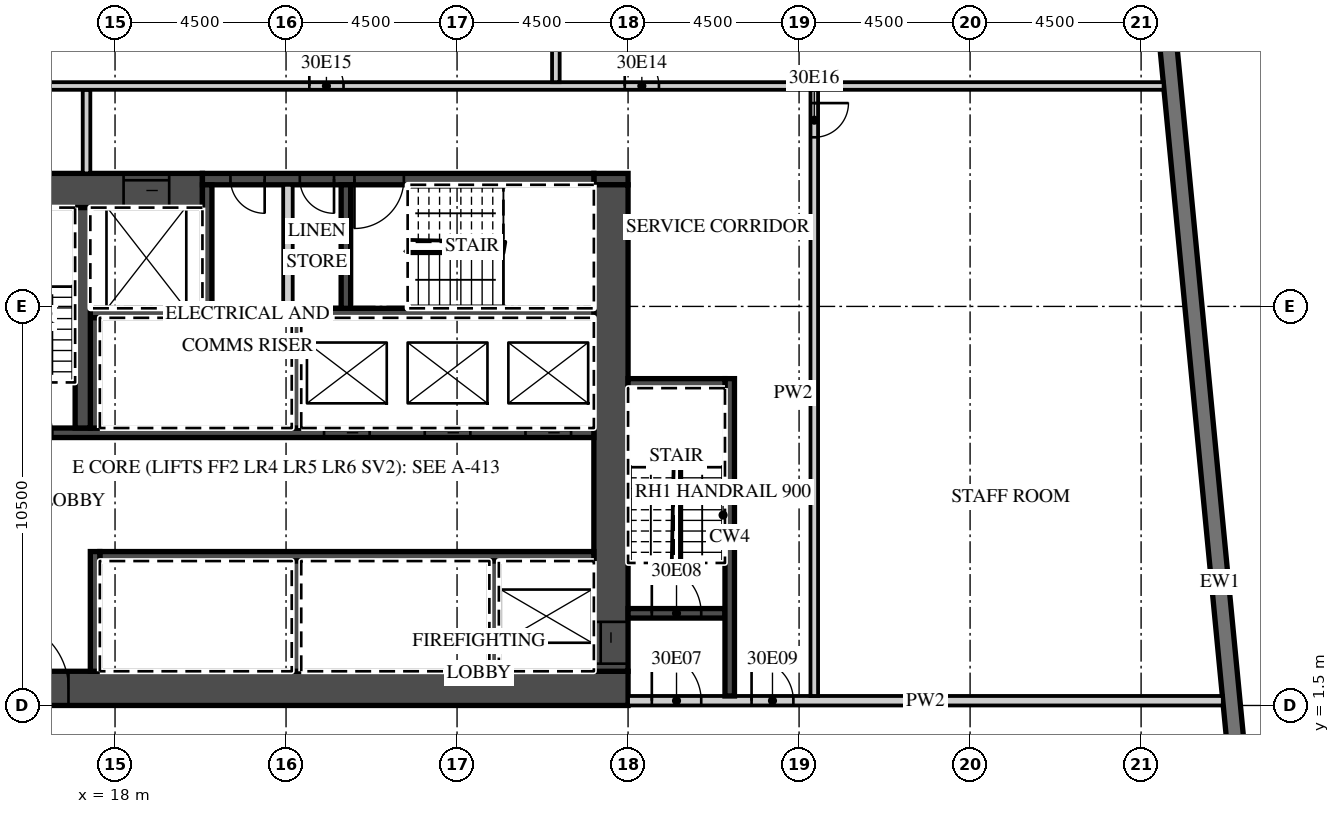
"""IFC4 building model, lengths in metres.
Left out: names, types, materials, properties, quantities, classifications, styles, units other than length and angle.
Written with IfcOpenShell. Run it as: python <this file> out.ifc"""

import sys

from ifc_helpers import new_model, si_unit, direction, frame, frame_2d, origin, place, context, subcontext, project, spatial, rectangle, extrude, element, fill, save


model = new_model("IFC4")
c1 = context("Model", 3, precision=1e-05, world=origin(), true_north=direction((0.0, 1.0)))
c2 = subcontext(c1, "Body", "Model", "MODEL_VIEW")
j1 = project(units=[si_unit("LENGTHUNIT", "METRE"), si_unit("PLANEANGLEUNIT", "RADIAN")], contexts=[c1])
p1 = place(None, origin())
s1 = spatial("IfcSite", under=j1, at=p1, CompositionType="ELEMENT")
p2 = place(p1, origin())
s2 = spatial("IfcBuilding", under=s1, at=p2, CompositionType="ELEMENT")
p3 = place(p2, frame((0.0, 0.0, 133.9)))
s3 = spatial("IfcBuildingStorey", under=s2, at=p3, CompositionType="ELEMENT", Elevation=133.9)
p4 = place(p3, frame((48.753, -12.672, 0.0), z_axis=(0.0, 0.0, 1.0), x_axis=(-0.095842661909, 0.995396495954, 0.0)))
e1 = element("IfcWall", 1, at=p4, inside=s3, PredefinedType="SOLIDWALL", context=c2, shape_type="SweptSolid", body=[
    extrude(rectangle(XDim=35.0, YDim=0.45, at=frame_2d((17.5, 0.0))), origin(), (0.0, 0.0, 1.0), 3.02),
])
p5 = place(p4, frame((3.072, 0.0, 0.45)))
e2 = element("IfcOpeningElement", 2, at=p5, cuts=e1, PredefinedType="OPENING", context=c2, shape_type="SweptSolid", body=[
    extrude(rectangle(XDim=3.3, YDim=2.25, at=frame_2d((1.65, 1.125))), frame((0.0, 0.235, 0.0), z_axis=(0.0, -1.0, 0.0), x_axis=(1.0, 0.0, 0.0)), (0.0, 0.0, 1.0), 0.47),
])
p6 = place(p4, frame((7.593, 0.0, 0.45)))
e3 = element("IfcOpeningElement", 3, at=p6, cuts=e1, PredefinedType="OPENING", context=c2, shape_type="SweptSolid", body=[
    extrude(rectangle(XDim=3.3, YDim=2.25, at=frame_2d((1.65, 1.125))), frame((0.0, 0.235, 0.0), z_axis=(0.0, -1.0, 0.0), x_axis=(1.0, 0.0, 0.0)), (0.0, 0.0, 1.0), 0.47),
])
p7 = place(p3, frame((13.5, 1.95, 0.0), z_axis=(0.0, 0.0, 1.0), x_axis=(1.0, 0.0, 0.0)))
e4 = element("IfcWall", 4, at=p7, inside=s3, PredefinedType="SHEAR", context=c2, shape_type="SweptSolid", body=[
    extrude(rectangle(XDim=18.0, YDim=0.9, at=frame_2d((9.0, 0.0))), origin(), (0.0, 0.0, 1.0), 3.02),
])
p8 = place(p7, frame((1.475, 0.0, 0.0)))
e5 = element("IfcOpeningElement", 5, at=p8, cuts=e4, PredefinedType="OPENING", context=c2, shape_type="SweptSolid", body=[
    extrude(rectangle(XDim=1.8, YDim=2.1, at=frame_2d((0.9, 1.05))), frame((0.0, 0.46, 0.0), z_axis=(0.0, -1.0, 0.0), x_axis=(1.0, 0.0, 0.0)), (0.0, 0.0, 1.0), 0.92),
])
p9 = place(p3, frame((13.5, 15.05, 0.0), z_axis=(0.0, 0.0, 1.0), x_axis=(1.0, 0.0, 0.0)))
e6 = element("IfcWall", 6, at=p9, inside=s3, PredefinedType="SHEAR", context=c2, shape_type="SweptSolid", body=[
    extrude(rectangle(XDim=6.8, YDim=0.9, at=frame_2d((3.4, 0.0))), origin(), (0.0, 0.0, 1.0), 3.02),
])
p10 = place(p9, frame((4.725, 0.0, 0.0)))
e7 = element("IfcOpeningElement", 7, at=p10, cuts=e6, PredefinedType="OPENING", context=c2, shape_type="SweptSolid", body=[
    extrude(rectangle(XDim=1.2, YDim=2.1, at=frame_2d((0.6, 1.05))), frame((0.0, 0.46, 0.0), z_axis=(0.0, -1.0, 0.0), x_axis=(1.0, 0.0, 0.0)), (0.0, 0.0, 1.0), 0.92),
])
p11 = place(p3, frame((30.6, 15.35, 0.0), z_axis=(0.0, 0.0, 1.0), x_axis=(1.0, 0.0, 0.0)))
e8 = element("IfcWall", 8, at=p11, inside=s3, PredefinedType="SHEAR", context=c2, shape_type="SweptSolid", body=[
    extrude(rectangle(XDim=0.9, YDim=0.3, at=frame_2d((0.45, 0.0))), origin(), (0.0, 0.0, 1.0), 3.02),
])
p12 = place(p3, frame((20.3, 15.35, 0.0), z_axis=(0.0, 0.0, 1.0), x_axis=(1.0, 0.0, 0.0)))
e9 = element("IfcWall", 9, at=p12, inside=s3, PredefinedType="SHEAR", context=c2, shape_type="SweptSolid", body=[
    extrude(rectangle(XDim=10.3, YDim=0.3, at=frame_2d((5.15, 0.0))), origin(), (0.0, 0.0, 1.0), 3.02),
])
p13 = place(p12, frame((4.0, 0.0, 0.0)))
e10 = element("IfcOpeningElement", 10, at=p13, cuts=e9, PredefinedType="OPENING", context=c2, shape_type="SweptSolid", body=[
    extrude(rectangle(XDim=1.3, YDim=2.1, at=frame_2d((0.65, 1.05))), frame((0.0, 0.16, 0.0), z_axis=(0.0, -1.0, 0.0), x_axis=(1.0, 0.0, 0.0)), (0.0, 0.0, 1.0), 0.32),
])
p14 = place(p12, frame((2.562, 0.0, 0.0)))
e11 = element("IfcOpeningElement", 11, at=p14, cuts=e9, PredefinedType="OPENING", context=c2, shape_type="SweptSolid", body=[
    extrude(rectangle(XDim=0.9, YDim=2.1, at=frame_2d((0.45, 1.05))), frame((0.0, 0.16, 0.0), z_axis=(0.0, -1.0, 0.0), x_axis=(1.0, 0.0, 0.0)), (0.0, 0.0, 1.0), 0.32),
])
p15 = place(p12, frame((0.738, 0.0, 0.0)))
e12 = element("IfcOpeningElement", 12, at=p15, cuts=e9, PredefinedType="OPENING", context=c2, shape_type="SweptSolid", body=[
    extrude(rectangle(XDim=0.9, YDim=2.1, at=frame_2d((0.45, 1.05))), frame((0.0, 0.16, 0.0), z_axis=(0.0, -1.0, 0.0), x_axis=(1.0, 0.0, 0.0)), (0.0, 0.0, 1.0), 0.32),
])
p16 = place(p3, frame((31.05, 2.4, 0.0), z_axis=(0.0, 0.0, 1.0), x_axis=(0.0, 1.0, 0.0)))
e13 = element("IfcWall", 13, at=p16, inside=s3, PredefinedType="SHEAR", context=c2, shape_type="SweptSolid", body=[
    extrude(rectangle(XDim=12.8, YDim=0.9, at=frame_2d((6.4, 0.0))), origin(), (0.0, 0.0, 1.0), 3.02),
])
p17 = place(p16, frame((0.2, 0.0, 0.0)))
e14 = element("IfcOpeningElement", 14, at=p17, cuts=e13, PredefinedType="OPENING", context=c2, shape_type="SweptSolid", body=[
    extrude(rectangle(XDim=1.1, YDim=2.1, at=frame_2d((0.55, 1.05))), frame((0.0, 0.46, 0.0), z_axis=(0.0, -1.0, 0.0), x_axis=(1.0, 0.0, 0.0)), (0.0, 0.0, 1.0), 0.92),
])
p18 = place(p3, frame((17.6, 5.425, 0.0), z_axis=(0.0, 0.0, 1.0), x_axis=(1.0, 0.0, 0.0)))
e15 = element("IfcWall", 15, at=p18, inside=s3, PredefinedType="SHEAR", context=c2, shape_type="SweptSolid", body=[
    extrude(rectangle(XDim=13.0, YDim=0.25, at=frame_2d((6.5, 0.0))), origin(), (0.0, 0.0, 1.0), 3.02),
])
p19 = place(p3, frame((17.475, 2.4, 0.0), z_axis=(0.0, 0.0, 1.0), x_axis=(0.0, 1.0, 0.0)))
e16 = element("IfcWall", 16, at=p19, inside=s3, PredefinedType="SHEAR", context=c2, shape_type="SweptSolid", body=[
    extrude(rectangle(XDim=3.15, YDim=0.25, at=frame_2d((1.575, 0.0))), origin(), (0.0, 0.0, 1.0), 3.02),
])
for number, where, z_axis, x_axis in (
    (17, (27.975, 2.4, 0.0), (0.0, 0.0, 1.0), (0.0, 1.0, 0.0)),
    (18, (22.775, 2.4, 0.0), (0.0, 0.0, 1.0), (0.0, 1.0, 0.0)),
):
    element("IfcWall", number, at=place(p3, frame(where, z_axis=z_axis, x_axis=x_axis)), inside=s3, PredefinedType="SHEAR", context=c2, shape_type="SweptSolid", body=[
        extrude(rectangle(XDim=2.9, YDim=0.25, at=frame_2d((1.45, 0.0))), origin(), (0.0, 0.0, 1.0), 3.02),
    ])
p20 = place(p3, frame((14.4, 8.675, 0.0), z_axis=(0.0, 0.0, 1.0), x_axis=(1.0, 0.0, 0.0)))
e19 = element("IfcWall", 19, at=p20, inside=s3, PredefinedType="SHEAR", context=c2, shape_type="SweptSolid", body=[
    extrude(rectangle(XDim=16.2, YDim=0.25, at=frame_2d((8.1, 0.0))), origin(), (0.0, 0.0, 1.0), 3.02),
])
p21 = place(p20, frame((14.4, 0.0, 0.0)))
e20 = element("IfcOpeningElement", 20, at=p21, cuts=e19, PredefinedType="OPENING", context=c2, shape_type="SweptSolid", body=[
    extrude(rectangle(XDim=1.2, YDim=2.1, at=frame_2d((0.6, 1.05))), frame((0.0, 0.135, 0.0), z_axis=(0.0, -1.0, 0.0), x_axis=(1.0, 0.0, 0.0)), (0.0, 0.0, 1.0), 0.27),
])
p22 = place(p20, frame((11.75, 0.0, 0.0)))
e21 = element("IfcOpeningElement", 21, at=p22, cuts=e19, PredefinedType="OPENING", context=c2, shape_type="SweptSolid", body=[
    extrude(rectangle(XDim=1.2, YDim=2.1, at=frame_2d((0.6, 1.05))), frame((0.0, 0.135, 0.0), z_axis=(0.0, -1.0, 0.0), x_axis=(1.0, 0.0, 0.0)), (0.0, 0.0, 1.0), 0.27),
])
p23 = place(p20, frame((9.1, 0.0, 0.0)))
e22 = element("IfcOpeningElement", 22, at=p23, cuts=e19, PredefinedType="OPENING", context=c2, shape_type="SweptSolid", body=[
    extrude(rectangle(XDim=1.2, YDim=2.1, at=frame_2d((0.6, 1.05))), frame((0.0, 0.135, 0.0), z_axis=(0.0, -1.0, 0.0), x_axis=(1.0, 0.0, 0.0)), (0.0, 0.0, 1.0), 0.27),
])
p24 = place(p20, frame((0.65, 0.0, 0.0)))
e23 = element("IfcOpeningElement", 23, at=p24, cuts=e19, PredefinedType="OPENING", context=c2, shape_type="SweptSolid", body=[
    extrude(rectangle(XDim=1.3, YDim=2.1, at=frame_2d((0.65, 1.05))), frame((0.0, 0.135, 0.0), z_axis=(0.0, -1.0, 0.0), x_axis=(1.0, 0.0, 0.0)), (0.0, 0.0, 1.0), 0.27),
])
p25 = place(p3, frame((17.35, 11.825, 0.0), z_axis=(0.0, 0.0, 1.0), x_axis=(1.0, 0.0, 0.0)))
e24 = element("IfcWall", 24, at=p25, inside=s3, PredefinedType="SHEAR", context=c2, shape_type="SweptSolid", body=[
    extrude(rectangle(XDim=13.25, YDim=0.25, at=frame_2d((6.625, 0.0))), origin(), (0.0, 0.0, 1.0), 3.02),
])
for number, where, z_axis, x_axis in (
    (25, (17.475, 8.8, 0.0), (0.0, 0.0, 1.0), (0.0, 1.0, 0.0)),
    (26, (22.775, 8.8, 0.0), (0.0, 0.0, 1.0), (0.0, 1.0, 0.0)),
):
    element("IfcWall", number, at=place(p3, frame(where, z_axis=z_axis, x_axis=x_axis)), inside=s3, PredefinedType="SHEAR", context=c2, shape_type="SweptSolid", body=[
        extrude(rectangle(XDim=2.9, YDim=0.25, at=frame_2d((1.45, 0.0))), origin(), (0.0, 0.0, 1.0), 3.02),
    ])
p26 = place(p3, frame((17.15, 8.8, 0.0), z_axis=(0.0, 0.0, 1.0), x_axis=(0.0, 1.0, 0.0)))
e27 = element("IfcWall", 27, at=p26, inside=s3, PredefinedType="SHEAR", context=c2, shape_type="SweptSolid", body=[
    extrude(rectangle(XDim=5.8, YDim=0.4, at=frame_2d((2.9, 0.0))), origin(), (0.0, 0.0, 1.0), 3.02),
])
for number, where, z_axis, x_axis in (
    (28, (20.425, 11.95, 0.0), (0.0, 0.0, 1.0), (0.0, 1.0, 0.0)),
    (29, (24.075, 11.95, 0.0), (0.0, 0.0, 1.0), (0.0, 1.0, 0.0)),
):
    element("IfcWall", number, at=place(p3, frame(where, z_axis=z_axis, x_axis=x_axis)), inside=s3, PredefinedType="SHEAR", context=c2, shape_type="SweptSolid", body=[
        extrude(rectangle(XDim=3.25, YDim=0.25, at=frame_2d((1.625, 0.0))), origin(), (0.0, 0.0, 1.0), 3.02),
    ])
p27 = place(p3, frame((22.55, 11.95, 0.0), z_axis=(0.0, 0.0, 1.0), x_axis=(0.0, 1.0, 0.0)))
e30 = element("IfcWall", 30, at=p27, inside=s3, PredefinedType="PARTITIONING", context=c2, shape_type="SweptSolid", body=[
    extrude(rectangle(XDim=3.25, YDim=0.25, at=frame_2d((1.625, 0.0))), origin(), (0.0, 0.0, 1.0), 3.02),
])
p28 = place(p3, frame((31.5, 1.625, 0.0), z_axis=(0.0, 0.0, 1.0), x_axis=(1.0, 0.0, 0.0)))
e31 = element("IfcWall", 31, at=p28, inside=s3, PredefinedType="PARTITIONING", context=c2, shape_type="SweptSolid", body=[
    extrude(rectangle(XDim=15.65, YDim=0.25, at=frame_2d((7.825, 0.0))), origin(), (0.0, 0.0, 1.0), 3.02),
])
p29 = place(p28, frame((0.625, 0.0, 0.0)))
e32 = element("IfcOpeningElement", 32, at=p29, cuts=e31, PredefinedType="OPENING", context=c2, shape_type="SweptSolid", body=[
    extrude(rectangle(XDim=1.3, YDim=2.1, at=frame_2d((0.65, 1.05))), frame((0.0, 0.135, 0.0), z_axis=(0.0, -1.0, 0.0), x_axis=(1.0, 0.0, 0.0)), (0.0, 0.0, 1.0), 0.27),
])
p30 = place(p28, frame((3.25, 0.0, 0.0)))
e33 = element("IfcOpeningElement", 33, at=p30, cuts=e31, PredefinedType="OPENING", context=c2, shape_type="SweptSolid", body=[
    extrude(rectangle(XDim=1.1, YDim=2.1, at=frame_2d((0.55, 1.05))), frame((0.0, 0.135, 0.0), z_axis=(0.0, -1.0, 0.0), x_axis=(1.0, 0.0, 0.0)), (0.0, 0.0, 1.0), 0.27),
])
p31 = place(p3, frame((31.5, 3.925, 0.0), z_axis=(0.0, 0.0, 1.0), x_axis=(1.0, 0.0, 0.0)))
e34 = element("IfcWall", 34, at=p31, inside=s3, PredefinedType="SHEAR", context=c2, shape_type="SweptSolid", body=[
    extrude(rectangle(XDim=2.55, YDim=0.25, at=frame_2d((1.275, 0.0))), origin(), (0.0, 0.0, 1.0), 3.02),
])
p32 = place(p31, frame((0.625, 0.0, 0.0)))
e35 = element("IfcOpeningElement", 35, at=p32, cuts=e34, PredefinedType="OPENING", context=c2, shape_type="SweptSolid", body=[
    extrude(rectangle(XDim=1.3, YDim=2.1, at=frame_2d((0.65, 1.05))), frame((0.0, 0.135, 0.0), z_axis=(0.0, -1.0, 0.0), x_axis=(1.0, 0.0, 0.0)), (0.0, 0.0, 1.0), 0.27),
])
p33 = place(p3, frame((34.175, 1.75, 0.0), z_axis=(0.0, 0.0, 1.0), x_axis=(0.0, 1.0, 0.0)))
e36 = element("IfcWall", 36, at=p33, inside=s3, PredefinedType="SHEAR", context=c2, shape_type="SweptSolid", body=[
    extrude(rectangle(XDim=8.35, YDim=0.25, at=frame_2d((4.175, 0.0))), origin(), (0.0, 0.0, 1.0), 3.02),
])
p34 = place(p3, frame((31.5, 9.975, 0.0), z_axis=(0.0, 0.0, 1.0), x_axis=(1.0, 0.0, 0.0)))
e37 = element("IfcWall", 37, at=p34, inside=s3, PredefinedType="SHEAR", context=c2, shape_type="SweptSolid", body=[
    extrude(rectangle(XDim=2.55, YDim=0.25, at=frame_2d((1.275, 0.0))), origin(), (0.0, 0.0, 1.0), 3.02),
])
p35 = place(p3, frame((17.25, 15.5, 0.0), z_axis=(0.0, 0.0, 1.0), x_axis=(0.0, 1.0, 0.0)))
e38 = element("IfcWall", 38, at=p35, inside=s3, PredefinedType="PARTITIONING", context=c2, shape_type="SweptSolid", body=[
    extrude(rectangle(XDim=2.2, YDim=0.2, at=frame_2d((1.1, 0.0))), origin(), (0.0, 0.0, 1.0), 3.02),
])
p36 = place(p3, frame((36.4, 1.75, 0.0), z_axis=(0.0, 0.0, 1.0), x_axis=(0.0, 1.0, 0.0)))
e39 = element("IfcWall", 39, at=p36, inside=s3, PredefinedType="PARTITIONING", context=c2, shape_type="SweptSolid", body=[
    extrude(rectangle(XDim=15.95, YDim=0.2, at=frame_2d((7.975, 0.0))), origin(), (0.0, 0.0, 1.0), 3.02),
])
p37 = place(p36, frame((14.7, 0.0, 0.0)))
e40 = element("IfcOpeningElement", 40, at=p37, cuts=e39, PredefinedType="OPENING", context=c2, shape_type="SweptSolid", body=[
    extrude(rectangle(XDim=0.9, YDim=2.1, at=frame_2d((0.45, 1.05))), frame((0.0, 0.11, 0.0), z_axis=(0.0, -1.0, 0.0), x_axis=(1.0, 0.0, 0.0)), (0.0, 0.0, 1.0), 0.22),
])
p38 = place(p3, frame((13.6, 17.8, 0.0), z_axis=(0.0, 0.0, 1.0), x_axis=(1.0, 0.0, 0.0)))
e41 = element("IfcWall", 41, at=p38, inside=s3, PredefinedType="PARTITIONING", context=c2, shape_type="SweptSolid", body=[
    extrude(rectangle(XDim=31.993, YDim=0.2, at=frame_2d((15.997, 0.0))), origin(), (0.0, 0.0, 1.0), 3.02),
])
p39 = place(p38, frame((17.812, 0.0, 0.0)))
e42 = element("IfcOpeningElement", 42, at=p39, cuts=e41, PredefinedType="OPENING", context=c2, shape_type="SweptSolid", body=[
    extrude(rectangle(XDim=0.9, YDim=2.1, at=frame_2d((0.45, 1.05))), frame((0.0, 0.11, 0.0), z_axis=(0.0, -1.0, 0.0), x_axis=(1.0, 0.0, 0.0)), (0.0, 0.0, 1.0), 0.22),
])
p40 = place(p38, frame((9.512, 0.0, 0.0)))
e43 = element("IfcOpeningElement", 43, at=p40, cuts=e41, PredefinedType="OPENING", context=c2, shape_type="SweptSolid", body=[
    extrude(rectangle(XDim=0.9, YDim=2.1, at=frame_2d((0.45, 1.05))), frame((0.0, 0.11, 0.0), z_axis=(0.0, -1.0, 0.0), x_axis=(1.0, 0.0, 0.0)), (0.0, 0.0, 1.0), 0.22),
])
p41 = place(p3, frame((29.6, 17.9, 0.0), z_axis=(0.0, 0.0, 1.0), x_axis=(0.0, 1.0, 0.0)))
e44 = element("IfcWall", 44, at=p41, inside=s3, PredefinedType="PARTITIONING", context=c2, shape_type="SweptSolid", body=[
    extrude(rectangle(XDim=6.313, YDim=0.2, at=frame_2d((3.157, 0.0))), origin(), (0.0, 0.0, 1.0), 3.02),
])
p42 = place(p21, origin())
e45 = element("IfcDoor", 45, at=p42, inside=s3, OperationType="SLIDING_TO_LEFT", PredefinedType="DOOR", context=c2, shape_type="SweptSolid", body=[
    extrude(rectangle(XDim=1.2, YDim=2.1, at=frame_2d((0.6, 1.05))), frame((0.0, 0.025, 0.0), z_axis=(0.0, -1.0, 0.0), x_axis=(1.0, 0.0, 0.0)), (0.0, 0.0, 1.0), 0.05),
])
fill(e20, e45)
p43 = place(p22, origin())
e46 = element("IfcDoor", 46, at=p43, inside=s3, OperationType="SLIDING_TO_RIGHT", PredefinedType="DOOR", context=c2, shape_type="SweptSolid", body=[
    extrude(rectangle(XDim=1.2, YDim=2.1, at=frame_2d((0.6, 1.05))), frame((0.0, 0.025, 0.0), z_axis=(0.0, -1.0, 0.0), x_axis=(1.0, 0.0, 0.0)), (0.0, 0.0, 1.0), 0.05),
])
fill(e21, e46)
p44 = place(p23, origin())
e47 = element("IfcDoor", 47, at=p44, inside=s3, OperationType="SLIDING_TO_RIGHT", PredefinedType="DOOR", context=c2, shape_type="SweptSolid", body=[
    extrude(rectangle(XDim=1.2, YDim=2.1, at=frame_2d((0.6, 1.05))), frame((0.0, 0.025, 0.0), z_axis=(0.0, -1.0, 0.0), x_axis=(1.0, 0.0, 0.0)), (0.0, 0.0, 1.0), 0.05),
])
fill(e22, e47)
p45 = place(p10, origin())
e48 = element("IfcDoor", 48, at=p45, inside=s3, OperationType="SLIDING_TO_LEFT", PredefinedType="DOOR", context=c2, shape_type="SweptSolid", body=[
    extrude(rectangle(XDim=1.2, YDim=2.1, at=frame_2d((0.6, 1.05))), frame((0.0, 0.025, 0.0), z_axis=(0.0, -1.0, 0.0), x_axis=(1.0, 0.0, 0.0)), (0.0, 0.0, 1.0), 0.05),
])
fill(e7, e48)
p46 = place(p17, origin())
e49 = element("IfcDoor", 49, at=p46, inside=s3, OperationType="SLIDING_TO_LEFT", PredefinedType="DOOR", context=c2, shape_type="SweptSolid", body=[
    extrude(rectangle(XDim=1.1, YDim=2.1, at=frame_2d((0.55, 1.05))), frame((0.0, 0.025, 0.0), z_axis=(0.0, -1.0, 0.0), x_axis=(1.0, 0.0, 0.0)), (0.0, 0.0, 1.0), 0.05),
])
fill(e14, e49)
p47 = place(p8, origin())
e50 = element("IfcDoor", 50, at=p47, inside=s3, OperationType="DOUBLE_DOOR_DOUBLE_SWING", PredefinedType="DOOR", context=c2, shape_type="SweptSolid", body=[
    extrude(rectangle(XDim=1.8, YDim=2.1, at=frame_2d((0.9, 1.05))), frame((0.0, 0.025, 0.0), z_axis=(0.0, -1.0, 0.0), x_axis=(1.0, 0.0, 0.0)), (0.0, 0.0, 1.0), 0.05),
])
fill(e5, e50)
p48 = place(p29, origin())
e51 = element("IfcDoor", 51, at=p48, inside=s3, OperationType="SINGLE_SWING_LEFT", PredefinedType="DOOR", context=c2, shape_type="SweptSolid", body=[
    extrude(rectangle(XDim=1.3, YDim=2.1, at=frame_2d((0.65, 1.05))), frame((0.0, 0.025, 0.0), z_axis=(0.0, -1.0, 0.0), x_axis=(1.0, 0.0, 0.0)), (0.0, 0.0, 1.0), 0.05),
])
fill(e32, e51)
p49 = place(p32, origin())
e52 = element("IfcDoor", 52, at=p49, inside=s3, OperationType="SINGLE_SWING_LEFT", PredefinedType="DOOR", context=c2, shape_type="SweptSolid", body=[
    extrude(rectangle(XDim=1.3, YDim=2.1, at=frame_2d((0.65, 1.05))), frame((0.0, 0.025, 0.0), z_axis=(0.0, -1.0, 0.0), x_axis=(1.0, 0.0, 0.0)), (0.0, 0.0, 1.0), 0.05),
])
fill(e35, e52)
p50 = place(p30, origin())
e53 = element("IfcDoor", 53, at=p50, inside=s3, OperationType="SINGLE_SWING_LEFT", PredefinedType="DOOR", context=c2, shape_type="SweptSolid", body=[
    extrude(rectangle(XDim=1.1, YDim=2.1, at=frame_2d((0.55, 1.05))), frame((0.0, 0.025, 0.0), z_axis=(0.0, -1.0, 0.0), x_axis=(1.0, 0.0, 0.0)), (0.0, 0.0, 1.0), 0.05),
])
fill(e33, e53)
p51 = place(p13, origin())
e54 = element("IfcDoor", 54, at=p51, inside=s3, OperationType="SINGLE_SWING_LEFT", PredefinedType="DOOR", context=c2, shape_type="SweptSolid", body=[
    extrude(rectangle(XDim=1.3, YDim=2.1, at=frame_2d((0.65, 1.05))), frame((0.0, 0.025, 0.0), z_axis=(0.0, -1.0, 0.0), x_axis=(1.0, 0.0, 0.0)), (0.0, 0.0, 1.0), 0.05),
])
fill(e10, e54)
p52 = place(p14, origin())
e55 = element("IfcDoor", 55, at=p52, inside=s3, OperationType="SINGLE_SWING_RIGHT", PredefinedType="DOOR", context=c2, shape_type="SweptSolid", body=[
    extrude(rectangle(XDim=0.9, YDim=2.1, at=frame_2d((0.45, 1.05))), frame((0.0, 0.025, 0.0), z_axis=(0.0, -1.0, 0.0), x_axis=(1.0, 0.0, 0.0)), (0.0, 0.0, 1.0), 0.05),
])
fill(e11, e55)
p53 = place(p15, origin())
e56 = element("IfcDoor", 56, at=p53, inside=s3, OperationType="SINGLE_SWING_RIGHT", PredefinedType="DOOR", context=c2, shape_type="SweptSolid", body=[
    extrude(rectangle(XDim=0.9, YDim=2.1, at=frame_2d((0.45, 1.05))), frame((0.0, 0.025, 0.0), z_axis=(0.0, -1.0, 0.0), x_axis=(1.0, 0.0, 0.0)), (0.0, 0.0, 1.0), 0.05),
])
fill(e12, e56)
p54 = place(p39, origin())
e57 = element("IfcDoor", 57, at=p54, inside=s3, OperationType="SINGLE_SWING_LEFT", PredefinedType="DOOR", context=c2, shape_type="SweptSolid", body=[
    extrude(rectangle(XDim=0.9, YDim=2.1, at=frame_2d((0.45, 1.05))), frame((0.0, 0.025, 0.0), z_axis=(0.0, -1.0, 0.0), x_axis=(1.0, 0.0, 0.0)), (0.0, 0.0, 1.0), 0.05),
])
fill(e42, e57)
p55 = place(p40, origin())
e58 = element("IfcDoor", 58, at=p55, inside=s3, OperationType="SINGLE_SWING_LEFT", PredefinedType="DOOR", context=c2, shape_type="SweptSolid", body=[
    extrude(rectangle(XDim=0.9, YDim=2.1, at=frame_2d((0.45, 1.05))), frame((0.0, 0.025, 0.0), z_axis=(0.0, -1.0, 0.0), x_axis=(1.0, 0.0, 0.0)), (0.0, 0.0, 1.0), 0.05),
])
fill(e43, e58)
p56 = place(p37, origin())
e59 = element("IfcDoor", 59, at=p56, inside=s3, OperationType="SINGLE_SWING_RIGHT", PredefinedType="DOOR", context=c2, shape_type="SweptSolid", body=[
    extrude(rectangle(XDim=0.9, YDim=2.1, at=frame_2d((0.45, 1.05))), frame((0.0, 0.025, 0.0), z_axis=(0.0, -1.0, 0.0), x_axis=(1.0, 0.0, 0.0)), (0.0, 0.0, 1.0), 0.05),
])
fill(e40, e59)
save(model, sys.argv[1])
